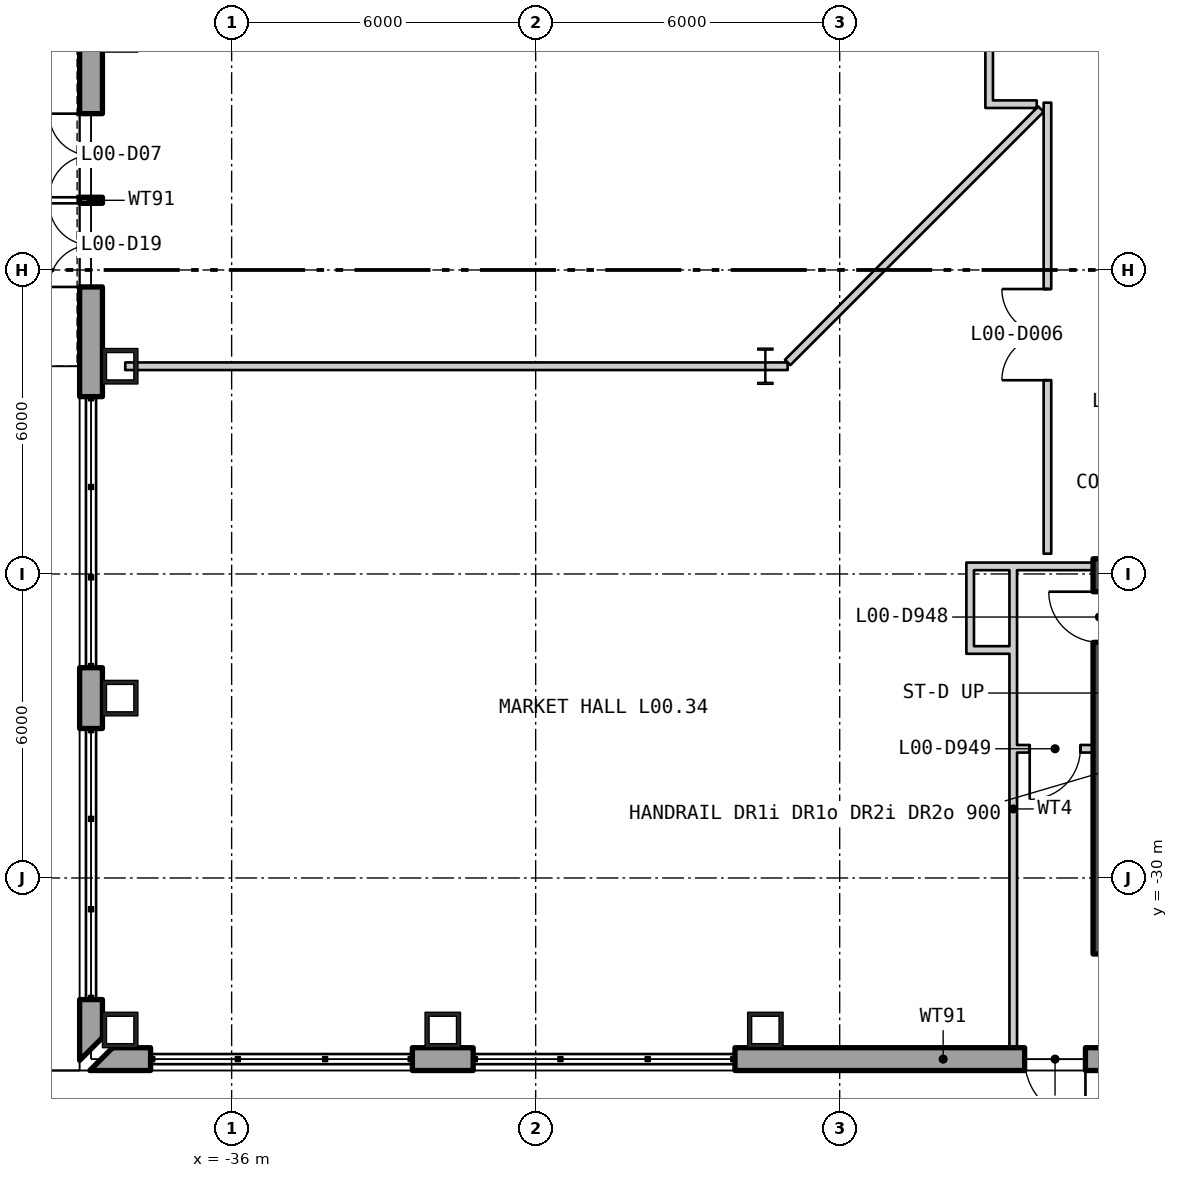
"""IFC4 building model, lengths in metres.
Left out: names, types, materials, properties, quantities, classifications, styles, units other than length and angle.
Written with IfcOpenShell. Run it as: python <this file> out.ifc"""

import sys

from ifc_helpers import new_model, si_unit, direction, frame, frame_2d, origin, origin_2d, place, context, subcontext, project, spatial, polyline, rectangle, hollow_rectangle, i_section, outline, extrude, element, fill, save


model = new_model("IFC4")
c1 = context("Model", 3, precision=1e-05, world=origin(), true_north=direction((0.0, 1.0)))
c2 = subcontext(c1, "Body", "Model", "MODEL_VIEW")
j1 = project(units=[si_unit("LENGTHUNIT", "METRE"), si_unit("PLANEANGLEUNIT", "RADIAN")], contexts=[c1])
p1 = place(None, origin())
s1 = spatial("IfcSite", under=j1, at=p1, CompositionType="ELEMENT")
p2 = place(p1, origin())
s2 = spatial("IfcBuilding", under=s1, at=p2, CompositionType="ELEMENT")
p3 = place(p2, origin())
s3 = spatial("IfcBuildingStorey", under=s2, at=p3, CompositionType="ELEMENT", Elevation=0.0)
for number, where, z_axis, x_axis in (
    (1, (-38.2, -19.9, 0.0), (0.0, 0.0, 1.0), (0.0, -1.0, 0.0)),
    (2, (-38.2, -26.45, 0.0), (0.0, 0.0, 1.0), (0.0, -1.0, 0.0)),
    (3, (-38.2, -33.0, 0.0), (0.0, 0.0, 1.0), (1.0, 0.0, 0.0)),
    (4, (-31.833, -33.0, 0.0), (0.0, 0.0, 1.0), (1.0, 0.0, 0.0)),
    (5, (-25.467, -33.0, 0.0), (0.0, 0.0, 1.0), (1.0, 0.0, 0.0)),
):
    element("IfcColumn", number, at=place(p3, frame(where, z_axis=z_axis, x_axis=x_axis)), inside=s3, PredefinedType="COLUMN", context=c2, shape_type="SweptSolid", body=[
        extrude(hollow_rectangle(XDim=0.7, YDim=0.7, WallThickness=0.08, at=origin_2d()), origin(), (0.0, 0.0, 1.0), 8.4),
    ])
p4 = place(p3, frame((-25.467, -19.9, 0.0), z_axis=(0.0, 0.0, 1.0), x_axis=(1.0, 0.0, 0.0)))
e6 = element("IfcColumn", 6, at=p4, inside=s3, PredefinedType="COLUMN", context=c2, shape_type="SweptSolid", body=[
    extrude(i_section(OverallWidth=0.304, OverallDepth=0.716, WebThickness=0.021, FlangeThickness=0.04, at=origin_2d()), origin(), (0.0, 0.0, 1.0), 8.4),
])
p5 = place(p3, frame((-38.775, 19.975, 5.4), z_axis=(0.0, 0.0, 1.0), x_axis=(0.0, -1.0, 0.0)))
e7 = element("IfcWall", 7, at=p5, inside=s3, PredefinedType="SOLIDWALL", context=c2, shape_type="SweptSolid", body=[
    extrude(outline(polyline([(-0.225, -0.225), (53.775, -0.225), (53.325, 0.225), (0.225, 0.225), (-0.225, -0.225)])), origin(), (0.0, 0.0, 1.0), 2.6),
])
for number, where, z_axis, x_axis in (
    (8, (-38.775, -12.75, -0.4), (0.0, 0.0, 1.0), (0.0, -1.0, 0.0)),
    (9, (-38.775, -19.3, -0.4), (0.0, 0.0, 1.0), (0.0, -1.0, 0.0)),
):
    element("IfcWall", number, at=place(p3, frame(where, z_axis=z_axis, x_axis=x_axis)), inside=s3, PredefinedType="SOLIDWALL", context=c2, shape_type="SweptSolid", body=[
        extrude(outline(polyline([(0.0, -0.225), (1.2, -0.225), (1.2, 0.225), (0.0, 0.225), (0.0, -0.225)])), origin(), (0.0, 0.0, 1.0), 5.51),
    ])
p6 = place(p3, frame((-38.775, -25.85, -0.4), z_axis=(0.0, 0.0, 1.0), x_axis=(0.0, -1.0, 0.0)))
e10 = element("IfcWall", 10, at=p6, inside=s3, PredefinedType="SOLIDWALL", context=c2, shape_type="SweptSolid", body=[
    extrude(outline(polyline([(0.0, -0.225), (1.2, -0.225), (1.2, 0.225), (0.0, 0.225), (0.0, -0.225)])), origin(), (0.0, 0.0, 1.0), 5.8),
])
p7 = place(p3, frame((-38.775, -32.4, -0.4), z_axis=(0.0, 0.0, 1.0), x_axis=(0.0, -1.0, 0.0)))
e11 = element("IfcWall", 11, at=p7, inside=s3, PredefinedType="SOLIDWALL", context=c2, shape_type="SweptSolid", body=[
    extrude(outline(polyline([(0.0, -0.225), (1.2, -0.225), (0.75, 0.225), (0.0, 0.225), (0.0, -0.225)])), origin(), (0.0, 0.0, 1.0), 5.8),
])
p8 = place(p3, frame((-38.775, -13.95, -0.4), z_axis=(0.0, 0.0, 1.0), x_axis=(0.0, -1.0, 0.0)))
e12 = element("IfcWall", 12, at=p8, inside=s3, PredefinedType="SOLIDWALL", context=c2, shape_type="SweptSolid", body=[
    extrude(outline(polyline([(0.0, -0.225), (5.35, -0.225), (5.35, 0.225), (0.0, 0.225), (0.0, -0.225)])), origin(), (0.0, 0.0, 1.0), 5.8),
])
p9 = place(p8, frame((0.965, 0.0, 0.4)))
e13 = element("IfcOpeningElement", 13, at=p9, cuts=e12, PredefinedType="OPENING", context=c2, shape_type="SweptSolid", body=[
    extrude(rectangle(XDim=1.65, YDim=3.0, at=frame_2d((0.825, 1.5))), frame((0.0, 0.235, 0.0), z_axis=(0.0, -1.0, 0.0), x_axis=(1.0, 0.0, 0.0)), (0.0, 0.0, 1.0), 0.47),
])
p10 = place(p8, frame((2.735, 0.0, 0.4)))
e14 = element("IfcOpeningElement", 14, at=p10, cuts=e12, PredefinedType="OPENING", context=c2, shape_type="SweptSolid", body=[
    extrude(rectangle(XDim=1.65, YDim=3.0, at=frame_2d((0.825, 1.5))), frame((0.0, 0.235, 0.0), z_axis=(0.0, -1.0, 0.0), x_axis=(1.0, 0.0, 0.0)), (0.0, 0.0, 1.0), 0.47),
])
for number, where, z_axis, x_axis in (
    (15, (-38.775, -20.5, -0.4), (0.0, 0.0, 1.0), (0.0, -1.0, 0.0)),
    (16, (-38.775, -27.05, -0.4), (0.0, 0.0, 1.0), (0.0, -1.0, 0.0)),
):
    element("IfcWall", number, at=place(p3, frame(where, z_axis=z_axis, x_axis=x_axis)), inside=s3, PredefinedType="SOLIDWALL", context=c2, shape_type="SweptSolid", body=[
        extrude(outline(polyline([(0.0, -0.225), (5.35, -0.225), (5.35, 0.225), (0.0, 0.225), (0.0, -0.225)])), origin(), (0.0, 0.0, 1.0), 1.0),
    ])
p11 = place(p3, frame((-38.775, -33.575, 5.4), z_axis=(0.0, 0.0, 1.0), x_axis=(1.0, 0.0, 0.0)))
e17 = element("IfcWall", 17, at=p11, inside=s3, PredefinedType="SOLIDWALL", context=c2, shape_type="SweptSolid", body=[
    extrude(outline(polyline([(-0.225, -0.225), (77.775, -0.225), (77.325, 0.225), (0.225, 0.225), (-0.225, -0.225)])), origin(), (0.0, 0.0, 1.0), 2.6),
])
p12 = place(p3, frame((-38.575, -33.575, -0.4), z_axis=(0.0, 0.0, 1.0), x_axis=(1.0, 0.0, 0.0)))
e18 = element("IfcWall", 18, at=p12, inside=s3, PredefinedType="SOLIDWALL", context=c2, shape_type="SweptSolid", body=[
    extrude(outline(polyline([(-0.225, -0.225), (0.975, -0.225), (0.975, 0.225), (0.225, 0.225), (-0.225, -0.225)])), origin(), (0.0, 0.0, 1.0), 5.8),
])
for number, where, z_axis, x_axis in (
    (19, (-32.433, -33.575, -0.4), (0.0, 0.0, 1.0), (1.0, 0.0, 0.0)),
    (20, (-26.067, -33.575, -0.4), (0.0, 0.0, 1.0), (1.0, 0.0, 0.0)),
):
    element("IfcWall", number, at=place(p3, frame(where, z_axis=z_axis, x_axis=x_axis)), inside=s3, PredefinedType="SOLIDWALL", context=c2, shape_type="SweptSolid", body=[
        extrude(outline(polyline([(0.0, -0.225), (1.2, -0.225), (1.2, 0.225), (0.0, 0.225), (0.0, -0.225)])), origin(), (0.0, 0.0, 1.0), 5.8),
    ])
p13 = place(p3, frame((-19.05, -33.575, -0.4), z_axis=(0.0, 0.0, 1.0), x_axis=(1.0, 0.0, 0.0)))
e21 = element("IfcWall", 21, at=p13, inside=s3, PredefinedType="SOLIDWALL", context=c2, shape_type="SweptSolid", body=[
    extrude(outline(polyline([(0.0, -0.225), (0.55, -0.225), (0.55, 0.225), (0.0, 0.225), (0.0, -0.225)])), origin(), (0.0, 0.0, 1.0), 5.8),
])
p14 = place(p3, frame((-37.6, -33.575, -0.4), z_axis=(0.0, 0.0, 1.0), x_axis=(1.0, 0.0, 0.0)))
e22 = element("IfcWall", 22, at=p14, inside=s3, PredefinedType="SOLIDWALL", context=c2, shape_type="SweptSolid", body=[
    extrude(outline(polyline([(0.0, -0.225), (5.167, -0.225), (5.167, 0.225), (0.0, 0.225), (0.0, -0.225)])), origin(), (0.0, 0.0, 1.0), 1.0),
])
p15 = place(p3, frame((-31.233, -33.575, -0.4), z_axis=(0.0, 0.0, 1.0), x_axis=(1.0, 0.0, 0.0)))
e23 = element("IfcWall", 23, at=p15, inside=s3, PredefinedType="SOLIDWALL", context=c2, shape_type="SweptSolid", body=[
    extrude(outline(polyline([(0.0, -0.225), (5.167, -0.225), (5.167, 0.225), (0.0, 0.225), (0.0, -0.225)])), origin(), (0.0, 0.0, 1.0), 1.0),
])
p16 = place(p3, frame((-24.867, -33.575, -0.4), z_axis=(0.0, 0.0, 1.0), x_axis=(1.0, 0.0, 0.0)))
e24 = element("IfcWall", 24, at=p16, inside=s3, PredefinedType="SOLIDWALL", context=c2, shape_type="SweptSolid", body=[
    extrude(outline(polyline([(0.0, -0.225), (5.817, -0.225), (5.817, 0.225), (0.0, 0.225), (0.0, -0.225)])), origin(), (0.0, 0.0, 1.0), 5.8),
])
p17 = place(p16, frame((4.517, 0.0, 0.4)))
e25 = element("IfcOpeningElement", 25, at=p17, cuts=e24, PredefinedType="OPENING", context=c2, shape_type="SweptSolid", body=[
    extrude(rectangle(XDim=1.2, YDim=2.4, at=frame_2d((0.6, 1.2))), frame((0.0, 0.235, 0.0), z_axis=(0.0, -1.0, 0.0), x_axis=(1.0, 0.0, 0.0)), (0.0, 0.0, 1.0), 0.47),
])
p18 = place(p3, frame((-18.875, -31.25, 0.0), z_axis=(0.0, 0.0, 1.0), x_axis=(0.0, 1.0, 0.0)))
e26 = element("IfcWall", 26, at=p18, inside=s3, PredefinedType="SHEAR", context=c2, shape_type="SweptSolid", body=[
    extrude(rectangle(XDim=7.3, YDim=0.25, at=frame_2d((3.65, 0.0))), origin(), (0.0, 0.0, 1.0), 8.18),
])
p19 = place(p18, frame((5.9, 0.0, 0.0)))
e27 = element("IfcOpeningElement", 27, at=p19, cuts=e26, PredefinedType="OPENING", context=c2, shape_type="SweptSolid", body=[
    extrude(rectangle(XDim=1.0, YDim=2.1, at=frame_2d((0.5, 1.05))), frame((0.0, 0.135, 0.0), z_axis=(0.0, -1.0, 0.0), x_axis=(1.0, 0.0, 0.0)), (0.0, 0.0, 1.0), 0.27),
])
for number, where, z_axis, x_axis in (
    (28, (-19.0, -31.375, 0.0), (0.0, 0.0, 1.0), (1.0, 0.0, 0.0)),
    (29, (-19.0, -23.825, 0.0), (0.0, 0.0, 1.0), (1.0, 0.0, 0.0)),
):
    element("IfcWall", number, at=place(p3, frame(where, z_axis=z_axis, x_axis=x_axis)), inside=s3, PredefinedType="SHEAR", context=c2, shape_type="SweptSolid", body=[
        extrude(rectangle(XDim=3.5, YDim=0.25, at=frame_2d((1.75, 0.0))), origin(), (0.0, 0.0, 1.0), 8.18),
    ])
p20 = place(p3, frame((-20.575, -33.35, 0.0), z_axis=(0.0, 0.0, 1.0), x_axis=(0.0, 1.0, 0.0)))
e30 = element("IfcWall", 30, at=p20, inside=s3, PredefinedType="PARTITIONING", context=c2, shape_type="SweptSolid", body=[
    extrude(rectangle(XDim=9.425, YDim=0.15, at=frame_2d((4.713, 0.0))), origin(), (0.0, 0.0, 1.0), 8.18),
])
p21 = place(p3, frame((-19.0, -23.85, 0.0), z_axis=(0.0, 0.0, 1.0), x_axis=(-1.0, 0.0, 0.0)))
e31 = element("IfcWall", 31, at=p21, inside=s3, PredefinedType="PARTITIONING", context=c2, shape_type="SweptSolid", body=[
    extrude(rectangle(XDim=2.35, YDim=0.15, at=frame_2d((1.175, 0.0))), origin(), (0.0, 0.0, 1.0), 8.18),
])
p22 = place(p3, frame((-20.5, -27.45, 0.0), z_axis=(0.0, 0.0, 1.0), x_axis=(1.0, 0.0, 0.0)))
e32 = element("IfcWall", 32, at=p22, inside=s3, PredefinedType="PARTITIONING", context=c2, shape_type="SweptSolid", body=[
    extrude(rectangle(XDim=1.5, YDim=0.15, at=frame_2d((0.75, 0.0))), origin(), (0.0, 0.0, 1.0), 8.18),
])
p23 = place(p22, frame((0.25, 0.0, 0.0)))
e33 = element("IfcOpeningElement", 33, at=p23, cuts=e32, PredefinedType="OPENING", context=c2, shape_type="SweptSolid", body=[
    extrude(rectangle(XDim=1.0, YDim=2.1, at=frame_2d((0.5, 1.05))), frame((0.0, 0.085, 0.0), z_axis=(0.0, -1.0, 0.0), x_axis=(1.0, 0.0, 0.0)), (0.0, 0.0, 1.0), 0.17),
])
p24 = place(p3, frame((-21.425, -25.575, 0.0), z_axis=(0.0, 0.0, 1.0), x_axis=(0.0, 1.0, 0.0)))
e34 = element("IfcWall", 34, at=p24, inside=s3, PredefinedType="PARTITIONING", context=c2, shape_type="SweptSolid", body=[
    extrude(rectangle(XDim=1.8, YDim=0.15, at=frame_2d((0.9, 0.0))), origin(), (0.0, 0.0, 1.0), 8.18),
])
p25 = place(p3, frame((-20.65, -25.5, 0.0), z_axis=(0.0, 0.0, 1.0), x_axis=(-1.0, 0.0, 0.0)))
e35 = element("IfcWall", 35, at=p25, inside=s3, PredefinedType="PARTITIONING", context=c2, shape_type="SweptSolid", body=[
    extrude(rectangle(XDim=0.7, YDim=0.15, at=frame_2d((0.35, 0.0))), origin(), (0.0, 0.0, 1.0), 8.18),
])
p26 = place(p3, frame((-38.1, -19.9, 0.0), z_axis=(0.0, 0.0, 1.0), x_axis=(1.0, 0.0, 0.0)))
e36 = element("IfcWall", 36, at=p26, inside=s3, PredefinedType="PARTITIONING", context=c2, shape_type="SweptSolid", body=[
    extrude(rectangle(XDim=12.633, YDim=0.15, at=frame_2d((6.316, 0.0))), origin(), (0.0, 0.0, 1.0), 7.39),
])
p27 = place(p3, frame((-25.467, -19.9, 0.0), z_axis=(0.0, 0.0, 1.0), x_axis=(1.0, 0.0, 0.0)))
e37 = element("IfcWall", 37, at=p27, inside=s3, PredefinedType="PARTITIONING", context=c2, shape_type="SweptSolid", body=[
    extrude(rectangle(XDim=0.44, YDim=0.15, at=frame_2d((0.22, 0.0))), origin(), (0.0, 0.0, 1.0), 8.18),
])
p28 = place(p3, frame((-25.027, -19.825, 0.0), z_axis=(0.0, 0.0, 1.0), x_axis=(0.707106781187, 0.707106781187, 0.0)))
e38 = element("IfcWall", 38, at=p28, inside=s3, PredefinedType="PARTITIONING", context=c2, shape_type="SweptSolid", body=[
    extrude(rectangle(XDim=7.07, YDim=0.15, at=frame_2d((3.535, 0.0))), origin(), (0.0, 0.0, 1.0), 8.18),
])
p29 = place(p3, frame((-21.05, -14.803, 0.0), z_axis=(0.0, 0.0, 1.0), x_axis=(0.0, 1.0, 0.0)))
e39 = element("IfcWall", 39, at=p29, inside=s3, PredefinedType="PARTITIONING", context=c2, shape_type="SweptSolid", body=[
    extrude(rectangle(XDim=10.86, YDim=0.15, at=frame_2d((5.43, 0.0))), origin(), (0.0, 0.0, 1.0), 8.18),
])
p30 = place(p29, frame((4.392, 0.0, 0.0)))
e40 = element("IfcOpeningElement", 40, at=p30, cuts=e39, PredefinedType="OPENING", context=c2, shape_type="SweptSolid", body=[
    extrude(rectangle(XDim=1.8, YDim=2.1, at=frame_2d((0.9, 1.05))), frame((0.0, 0.085, 0.0), z_axis=(0.0, -1.0, 0.0), x_axis=(1.0, 0.0, 0.0)), (0.0, 0.0, 1.0), 0.17),
])
p31 = place(p3, frame((-20.975, -14.728, 0.0), z_axis=(0.0, 0.0, 1.0), x_axis=(1.0, 0.0, 0.0)))
e41 = element("IfcWall", 41, at=p31, inside=s3, PredefinedType="PARTITIONING", context=c2, shape_type="SweptSolid", body=[
    extrude(rectangle(XDim=0.864, YDim=0.15, at=frame_2d((0.432, 0.0))), origin(), (0.0, 0.0, 1.0), 8.18),
])
p32 = place(p3, frame((-19.9, -23.6, 0.0), z_axis=(0.0, 0.0, 1.0), x_axis=(0.0, 1.0, 0.0)))
e42 = element("IfcWall", 42, at=p32, inside=s3, PredefinedType="PARTITIONING", context=c2, shape_type="SweptSolid", body=[
    extrude(rectangle(XDim=8.902, YDim=0.15, at=frame_2d((4.451, 0.0))), origin(), (0.0, 0.0, 1.0), 8.18),
])
p33 = place(p32, frame((3.424, 0.0, 0.0)))
e43 = element("IfcOpeningElement", 43, at=p33, cuts=e42, PredefinedType="OPENING", context=c2, shape_type="SweptSolid", body=[
    extrude(rectangle(XDim=1.8, YDim=2.1, at=frame_2d((0.9, 1.05))), frame((0.0, 0.085, 0.0), z_axis=(0.0, -1.0, 0.0), x_axis=(1.0, 0.0, 0.0)), (0.0, 0.0, 1.0), 0.17),
])
p34 = place(p9, frame((1.65, 0.0, 0.0), z_axis=(0.0, 0.0, 1.0), x_axis=(-1.0, 0.0, 0.0)))
e44 = element("IfcDoor", 44, at=p34, inside=s3, OperationType="DOUBLE_DOOR_DOUBLE_SWING", PredefinedType="DOOR", context=c2, shape_type="SweptSolid", body=[
    extrude(rectangle(XDim=1.65, YDim=3.0, at=frame_2d((0.825, 1.5))), frame((0.0, 0.025, 0.0), z_axis=(0.0, -1.0, 0.0), x_axis=(1.0, 0.0, 0.0)), (0.0, 0.0, 1.0), 0.05),
])
fill(e13, e44)
p35 = place(p10, frame((1.65, 0.0, 0.0), z_axis=(0.0, 0.0, 1.0), x_axis=(-1.0, 0.0, 0.0)))
e45 = element("IfcDoor", 45, at=p35, inside=s3, OperationType="DOUBLE_DOOR_DOUBLE_SWING", PredefinedType="DOOR", context=c2, shape_type="SweptSolid", body=[
    extrude(rectangle(XDim=1.65, YDim=3.0, at=frame_2d((0.825, 1.5))), frame((0.0, 0.025, 0.0), z_axis=(0.0, -1.0, 0.0), x_axis=(1.0, 0.0, 0.0)), (0.0, 0.0, 1.0), 0.05),
])
fill(e14, e45)
p36 = place(p17, frame((1.2, 0.0, 0.0), z_axis=(0.0, 0.0, 1.0), x_axis=(-1.0, 0.0, 0.0)))
e46 = element("IfcDoor", 46, at=p36, inside=s3, OperationType="SINGLE_SWING_RIGHT", PredefinedType="DOOR", context=c2, shape_type="SweptSolid", body=[
    extrude(rectangle(XDim=1.2, YDim=2.4, at=frame_2d((0.6, 1.2))), frame((0.0, 0.025, 0.0), z_axis=(0.0, -1.0, 0.0), x_axis=(1.0, 0.0, 0.0)), (0.0, 0.0, 1.0), 0.05),
])
fill(e25, e46)
p37 = place(p23, origin())
e47 = element("IfcDoor", 47, at=p37, inside=s3, OperationType="SINGLE_SWING_LEFT", PredefinedType="DOOR", context=c2, shape_type="SweptSolid", body=[
    extrude(rectangle(XDim=1.0, YDim=2.1, at=frame_2d((0.5, 1.05))), frame((0.0, 0.025, 0.0), z_axis=(0.0, -1.0, 0.0), x_axis=(1.0, 0.0, 0.0)), (0.0, 0.0, 1.0), 0.05),
])
fill(e33, e47)
p38 = place(p33, origin())
e48 = element("IfcDoor", 48, at=p38, inside=s3, OperationType="DOUBLE_DOOR_SINGLE_SWING", PredefinedType="DOOR", context=c2, shape_type="SweptSolid", body=[
    extrude(rectangle(XDim=1.8, YDim=2.1, at=frame_2d((0.9, 1.05))), frame((0.0, 0.025, 0.0), z_axis=(0.0, -1.0, 0.0), x_axis=(1.0, 0.0, 0.0)), (0.0, 0.0, 1.0), 0.05),
])
fill(e43, e48)
save(model, sys.argv[1])
